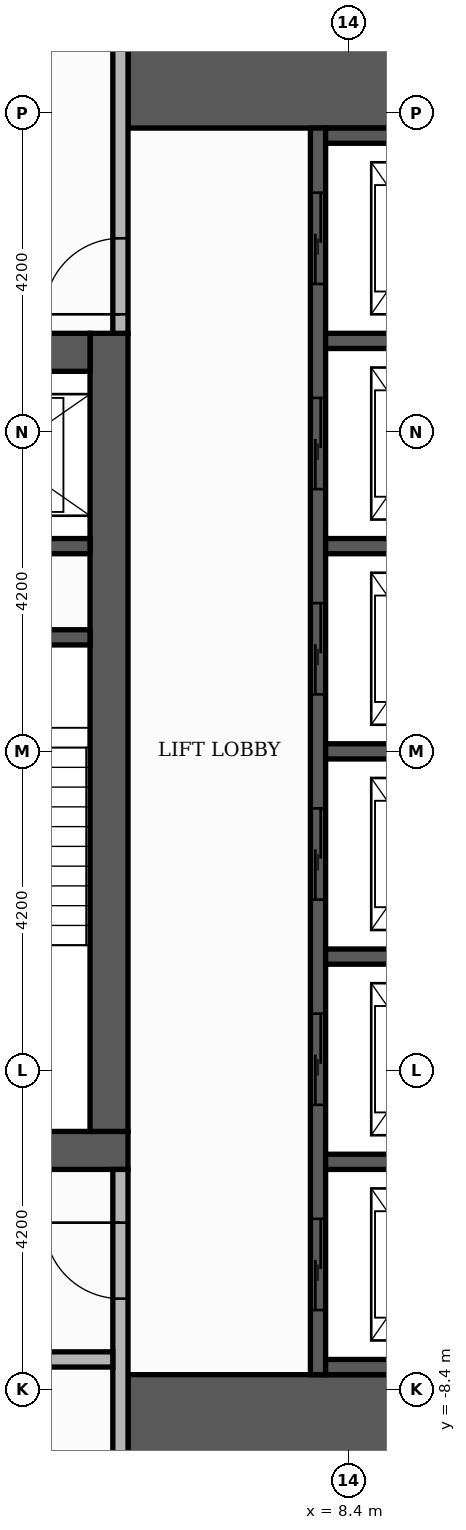
"""IFC4 building model, lengths in metres.
Left out: names, types, materials, properties, quantities, classifications, styles, units other than length and angle.
Written with IfcOpenShell. Run it as: python <this file> out.ifc"""

import sys

from ifc_helpers import new_model, si_unit, direction, frame, frame_2d, origin, place, context, subcontext, project, spatial, rectangle, extrude, element, fill, save


model = new_model("IFC4")
c1 = context("Model", 3, precision=1e-05, world=origin(), true_north=direction((0.0, 1.0)))
c2 = subcontext(c1, "Body", "Model", "MODEL_VIEW")
j1 = project(units=[si_unit("LENGTHUNIT", "METRE"), si_unit("PLANEANGLEUNIT", "RADIAN")], contexts=[c1])
p1 = place(None, origin())
s1 = spatial("IfcSite", under=j1, at=p1, CompositionType="ELEMENT")
p2 = place(p1, origin())
s2 = spatial("IfcBuilding", under=s1, at=p2, CompositionType="ELEMENT")
p3 = place(p2, frame((0.0, 0.0, 153.3)))
s3 = spatial("IfcBuildingStorey", under=s2, at=p3, CompositionType="ELEMENT", Elevation=153.3)
p4 = place(p3, frame((-5.5, -5.25, 0.0), z_axis=(0.0, 0.0, 1.0), x_axis=(1.0, 0.0, 0.0)))
e1 = element("IfcWall", 1, at=p4, inside=s3, PredefinedType="SHEAR", context=c2, shape_type="SweptSolid", body=[
    extrude(rectangle(XDim=11.0, YDim=0.5, at=frame_2d((5.5, 0.0))), origin(), (0.0, 0.0, 1.0), 3.48),
])
p5 = place(p4, frame((4.9, 0.0, 0.0)))
e2 = element("IfcOpeningElement", 2, at=p5, cuts=e1, PredefinedType="OPENING", context=c2, shape_type="SweptSolid", body=[
    extrude(rectangle(XDim=1.2, YDim=2.1, at=frame_2d((0.6, 1.05))), frame((0.0, 0.26, 0.0), z_axis=(0.0, -1.0, 0.0), x_axis=(1.0, 0.0, 0.0)), (0.0, 0.0, 1.0), 0.52),
])
p6 = place(p3, frame((5.25, -5.0, 0.0), z_axis=(0.0, 0.0, 1.0), x_axis=(0.0, 1.0, 0.0)))
e3 = element("IfcWall", 3, at=p6, inside=s3, PredefinedType="SHEAR", context=c2, shape_type="SweptSolid", body=[
    extrude(rectangle(XDim=10.5, YDim=0.5, at=frame_2d((5.25, 0.0))), origin(), (0.0, 0.0, 1.0), 3.48),
])
p7 = place(p3, frame((-5.0, 5.25, 0.0), z_axis=(0.0, 0.0, 1.0), x_axis=(1.0, 0.0, 0.0)))
e4 = element("IfcWall", 4, at=p7, inside=s3, PredefinedType="SHEAR", context=c2, shape_type="SweptSolid", body=[
    extrude(rectangle(XDim=10.0, YDim=0.5, at=frame_2d((5.0, 0.0))), origin(), (0.0, 0.0, 1.0), 3.48),
])
p8 = place(p7, frame((4.4, 0.0, 0.0)))
e5 = element("IfcOpeningElement", 5, at=p8, cuts=e4, PredefinedType="OPENING", context=c2, shape_type="SweptSolid", body=[
    extrude(rectangle(XDim=1.2, YDim=2.1, at=frame_2d((0.6, 1.05))), frame((0.0, 0.26, 0.0), z_axis=(0.0, -1.0, 0.0), x_axis=(1.0, 0.0, 0.0)), (0.0, 0.0, 1.0), 0.52),
])
for number, where, z_axis, x_axis in (
    (6, (5.5, -9.15, 0.0), (0.0, 0.0, 1.0), (1.0, 0.0, 0.0)),
    (7, (5.5, 9.15, 0.0), (0.0, 0.0, 1.0), (1.0, 0.0, 0.0)),
):
    element("IfcWall", number, at=place(p3, frame(where, z_axis=z_axis, x_axis=x_axis)), inside=s3, PredefinedType="SHEAR", context=c2, shape_type="SweptSolid", body=[
        extrude(rectangle(XDim=4.6, YDim=1.9, at=frame_2d((2.3, 0.0))), origin(), (0.0, 0.0, 1.0), 3.48),
    ])
p9 = place(p3, frame((2.15, 1.5, 0.0), z_axis=(0.0, 0.0, 1.0), x_axis=(1.0, 0.0, 0.0)))
e8 = element("IfcWall", 8, at=p9, inside=s3, PredefinedType="SHEAR", context=c2, shape_type="SweptSolid", body=[
    extrude(rectangle(XDim=2.85, YDim=0.2, at=frame_2d((1.425, 0.0))), origin(), (0.0, 0.0, 1.0), 3.48),
])
p10 = place(p3, frame((8.0, -8.2, 0.0), z_axis=(0.0, 0.0, 1.0), x_axis=(0.0, 1.0, 0.0)))
e9 = element("IfcWall", 9, at=p10, inside=s3, PredefinedType="SHEAR", context=c2, shape_type="SweptSolid", body=[
    extrude(rectangle(XDim=16.4, YDim=0.2, at=frame_2d((8.2, 0.0))), origin(), (0.0, 0.0, 1.0), 3.48),
])
p11 = place(p10, frame((0.85, 0.0, 0.0)))
e10 = element("IfcOpeningElement", 10, at=p11, cuts=e9, PredefinedType="OPENING", context=c2, shape_type="SweptSolid", body=[
    extrude(rectangle(XDim=1.2, YDim=2.1, at=frame_2d((0.6, 1.05))), frame((0.0, 0.11, 0.0), z_axis=(0.0, -1.0, 0.0), x_axis=(1.0, 0.0, 0.0)), (0.0, 0.0, 1.0), 0.22),
])
p12 = place(p10, frame((3.55, 0.0, 0.0)))
e11 = element("IfcOpeningElement", 11, at=p12, cuts=e9, PredefinedType="OPENING", context=c2, shape_type="SweptSolid", body=[
    extrude(rectangle(XDim=1.2, YDim=2.1, at=frame_2d((0.6, 1.05))), frame((0.0, 0.11, 0.0), z_axis=(0.0, -1.0, 0.0), x_axis=(1.0, 0.0, 0.0)), (0.0, 0.0, 1.0), 0.22),
])
p13 = place(p10, frame((6.25, 0.0, 0.0)))
e12 = element("IfcOpeningElement", 12, at=p13, cuts=e9, PredefinedType="OPENING", context=c2, shape_type="SweptSolid", body=[
    extrude(rectangle(XDim=1.2, YDim=2.1, at=frame_2d((0.6, 1.05))), frame((0.0, 0.11, 0.0), z_axis=(0.0, -1.0, 0.0), x_axis=(1.0, 0.0, 0.0)), (0.0, 0.0, 1.0), 0.22),
])
p14 = place(p10, frame((8.95, 0.0, 0.0)))
e13 = element("IfcOpeningElement", 13, at=p14, cuts=e9, PredefinedType="OPENING", context=c2, shape_type="SweptSolid", body=[
    extrude(rectangle(XDim=1.2, YDim=2.1, at=frame_2d((0.6, 1.05))), frame((0.0, 0.11, 0.0), z_axis=(0.0, -1.0, 0.0), x_axis=(1.0, 0.0, 0.0)), (0.0, 0.0, 1.0), 0.22),
])
p15 = place(p10, frame((11.65, 0.0, 0.0)))
e14 = element("IfcOpeningElement", 14, at=p15, cuts=e9, PredefinedType="OPENING", context=c2, shape_type="SweptSolid", body=[
    extrude(rectangle(XDim=1.2, YDim=2.1, at=frame_2d((0.6, 1.05))), frame((0.0, 0.11, 0.0), z_axis=(0.0, -1.0, 0.0), x_axis=(1.0, 0.0, 0.0)), (0.0, 0.0, 1.0), 0.22),
])
p16 = place(p10, frame((14.35, 0.0, 0.0)))
e15 = element("IfcOpeningElement", 15, at=p16, cuts=e9, PredefinedType="OPENING", context=c2, shape_type="SweptSolid", body=[
    extrude(rectangle(XDim=1.2, YDim=2.1, at=frame_2d((0.6, 1.05))), frame((0.0, 0.11, 0.0), z_axis=(0.0, -1.0, 0.0), x_axis=(1.0, 0.0, 0.0)), (0.0, 0.0, 1.0), 0.22),
])
for number, where, z_axis, x_axis in (
    (16, (8.1, -8.1, 0.0), (0.0, 0.0, 1.0), (1.0, 0.0, 0.0)),
    (17, (8.1, -5.4, 0.0), (0.0, 0.0, 1.0), (1.0, 0.0, 0.0)),
    (18, (8.1, -2.7, 0.0), (0.0, 0.0, 1.0), (1.0, 0.0, 0.0)),
    (19, (8.1, 0.0, 0.0), (0.0, 0.0, 1.0), (1.0, 0.0, 0.0)),
):
    element("IfcWall", number, at=place(p3, frame(where, z_axis=z_axis, x_axis=x_axis)), inside=s3, PredefinedType="SHEAR", context=c2, shape_type="SweptSolid", body=[
        extrude(rectangle(XDim=2.0, YDim=0.2, at=frame_2d((1.0, 0.0))), origin(), (0.0, 0.0, 1.0), 3.48),
    ])
p17 = place(p3, frame((2.15, 2.7, 0.0), z_axis=(0.0, 0.0, 1.0), x_axis=(1.0, 0.0, 0.0)))
e20 = element("IfcWall", 20, at=p17, inside=s3, PredefinedType="SHEAR", context=c2, shape_type="SweptSolid", body=[
    extrude(rectangle(XDim=2.85, YDim=0.2, at=frame_2d((1.425, 0.0))), origin(), (0.0, 0.0, 1.0), 3.48),
])
for number, where, z_axis, x_axis in (
    (21, (8.1, 2.7, 0.0), (0.0, 0.0, 1.0), (1.0, 0.0, 0.0)),
    (22, (8.1, 5.4, 0.0), (0.0, 0.0, 1.0), (1.0, 0.0, 0.0)),
    (23, (8.1, 8.1, 0.0), (0.0, 0.0, 1.0), (1.0, 0.0, 0.0)),
):
    element("IfcWall", number, at=place(p3, frame(where, z_axis=z_axis, x_axis=x_axis)), inside=s3, PredefinedType="SHEAR", context=c2, shape_type="SweptSolid", body=[
        extrude(rectangle(XDim=2.0, YDim=0.2, at=frame_2d((1.0, 0.0))), origin(), (0.0, 0.0, 1.0), 3.48),
    ])
p18 = place(p3, frame((5.4, -10.1, 0.0), z_axis=(0.0, 0.0, 1.0), x_axis=(0.0, 1.0, 0.0)))
e24 = element("IfcWall", 24, at=p18, inside=s3, PredefinedType="PARTITIONING", context=c2, shape_type="SweptSolid", body=[
    extrude(rectangle(XDim=4.6, YDim=0.2, at=frame_2d((2.3, 0.0))), origin(), (0.0, 0.0, 1.0), 3.48),
])
p19 = place(p18, frame((2.9, 0.0, 0.0)))
e25 = element("IfcOpeningElement", 25, at=p19, cuts=e24, PredefinedType="OPENING", context=c2, shape_type="SweptSolid", body=[
    extrude(rectangle(XDim=1.0, YDim=2.1, at=frame_2d((0.5, 1.05))), frame((0.0, 0.11, 0.0), z_axis=(0.0, -1.0, 0.0), x_axis=(1.0, 0.0, 0.0)), (0.0, 0.0, 1.0), 0.22),
])
p20 = place(p3, frame((2.35, -8.0, 0.0), z_axis=(0.0, 0.0, 1.0), x_axis=(1.0, 0.0, 0.0)))
e26 = element("IfcWall", 26, at=p20, inside=s3, PredefinedType="PARTITIONING", context=c2, shape_type="SweptSolid", body=[
    extrude(rectangle(XDim=2.95, YDim=0.2, at=frame_2d((1.475, 0.0))), origin(), (0.0, 0.0, 1.0), 3.48),
])
p21 = place(p20, frame((1.0, 0.0, 0.0)))
e27 = element("IfcOpeningElement", 27, at=p21, cuts=e26, PredefinedType="OPENING", context=c2, shape_type="SweptSolid", body=[
    extrude(rectangle(XDim=0.9, YDim=2.1, at=frame_2d((0.45, 1.05))), frame((0.0, 0.11, 0.0), z_axis=(0.0, -1.0, 0.0), x_axis=(1.0, 0.0, 0.0)), (0.0, 0.0, 1.0), 0.22),
])
p22 = place(p3, frame((5.4, 5.5, 0.0), z_axis=(0.0, 0.0, 1.0), x_axis=(0.0, 1.0, 0.0)))
e28 = element("IfcWall", 28, at=p22, inside=s3, PredefinedType="PARTITIONING", context=c2, shape_type="SweptSolid", body=[
    extrude(rectangle(XDim=4.6, YDim=0.2, at=frame_2d((2.3, 0.0))), origin(), (0.0, 0.0, 1.0), 3.48),
])
p23 = place(p22, frame((0.25, 0.0, 0.0)))
e29 = element("IfcOpeningElement", 29, at=p23, cuts=e28, PredefinedType="OPENING", context=c2, shape_type="SweptSolid", body=[
    extrude(rectangle(XDim=1.0, YDim=2.1, at=frame_2d((0.5, 1.05))), frame((0.0, 0.11, 0.0), z_axis=(0.0, -1.0, 0.0), x_axis=(1.0, 0.0, 0.0)), (0.0, 0.0, 1.0), 0.22),
])
p24 = place(p11, origin())
e30 = element("IfcDoor", 30, at=p24, inside=s3, OperationType="SLIDING_TO_LEFT", PredefinedType="DOOR", context=c2, shape_type="SweptSolid", body=[
    extrude(rectangle(XDim=1.2, YDim=2.1, at=frame_2d((0.6, 1.05))), frame((0.0, 0.025, 0.0), z_axis=(0.0, -1.0, 0.0), x_axis=(1.0, 0.0, 0.0)), (0.0, 0.0, 1.0), 0.05),
])
fill(e10, e30)
p25 = place(p12, origin())
e31 = element("IfcDoor", 31, at=p25, inside=s3, OperationType="SLIDING_TO_LEFT", PredefinedType="DOOR", context=c2, shape_type="SweptSolid", body=[
    extrude(rectangle(XDim=1.2, YDim=2.1, at=frame_2d((0.6, 1.05))), frame((0.0, 0.025, 0.0), z_axis=(0.0, -1.0, 0.0), x_axis=(1.0, 0.0, 0.0)), (0.0, 0.0, 1.0), 0.05),
])
fill(e11, e31)
p26 = place(p13, origin())
e32 = element("IfcDoor", 32, at=p26, inside=s3, OperationType="SLIDING_TO_LEFT", PredefinedType="DOOR", context=c2, shape_type="SweptSolid", body=[
    extrude(rectangle(XDim=1.2, YDim=2.1, at=frame_2d((0.6, 1.05))), frame((0.0, 0.025, 0.0), z_axis=(0.0, -1.0, 0.0), x_axis=(1.0, 0.0, 0.0)), (0.0, 0.0, 1.0), 0.05),
])
fill(e12, e32)
p27 = place(p14, origin())
e33 = element("IfcDoor", 33, at=p27, inside=s3, OperationType="SLIDING_TO_LEFT", PredefinedType="DOOR", context=c2, shape_type="SweptSolid", body=[
    extrude(rectangle(XDim=1.2, YDim=2.1, at=frame_2d((0.6, 1.05))), frame((0.0, 0.025, 0.0), z_axis=(0.0, -1.0, 0.0), x_axis=(1.0, 0.0, 0.0)), (0.0, 0.0, 1.0), 0.05),
])
fill(e13, e33)
p28 = place(p15, origin())
e34 = element("IfcDoor", 34, at=p28, inside=s3, OperationType="SLIDING_TO_LEFT", PredefinedType="DOOR", context=c2, shape_type="SweptSolid", body=[
    extrude(rectangle(XDim=1.2, YDim=2.1, at=frame_2d((0.6, 1.05))), frame((0.0, 0.025, 0.0), z_axis=(0.0, -1.0, 0.0), x_axis=(1.0, 0.0, 0.0)), (0.0, 0.0, 1.0), 0.05),
])
fill(e14, e34)
p29 = place(p16, origin())
e35 = element("IfcDoor", 35, at=p29, inside=s3, OperationType="SLIDING_TO_LEFT", PredefinedType="DOOR", context=c2, shape_type="SweptSolid", body=[
    extrude(rectangle(XDim=1.2, YDim=2.1, at=frame_2d((0.6, 1.05))), frame((0.0, 0.025, 0.0), z_axis=(0.0, -1.0, 0.0), x_axis=(1.0, 0.0, 0.0)), (0.0, 0.0, 1.0), 0.05),
])
fill(e15, e35)
p30 = place(p23, origin())
e36 = element("IfcDoor", 36, at=p30, inside=s3, OperationType="SINGLE_SWING_LEFT", PredefinedType="DOOR", context=c2, shape_type="SweptSolid", body=[
    extrude(rectangle(XDim=1.0, YDim=2.1, at=frame_2d((0.5, 1.05))), frame((0.0, 0.025, 0.0), z_axis=(0.0, -1.0, 0.0), x_axis=(1.0, 0.0, 0.0)), (0.0, 0.0, 1.0), 0.05),
])
fill(e29, e36)
p31 = place(p19, origin())
e37 = element("IfcDoor", 37, at=p31, inside=s3, OperationType="SINGLE_SWING_RIGHT", PredefinedType="DOOR", context=c2, shape_type="SweptSolid", body=[
    extrude(rectangle(XDim=1.0, YDim=2.1, at=frame_2d((0.5, 1.05))), frame((0.0, 0.025, 0.0), z_axis=(0.0, -1.0, 0.0), x_axis=(1.0, 0.0, 0.0)), (0.0, 0.0, 1.0), 0.05),
])
fill(e25, e37)
save(model, sys.argv[1])
